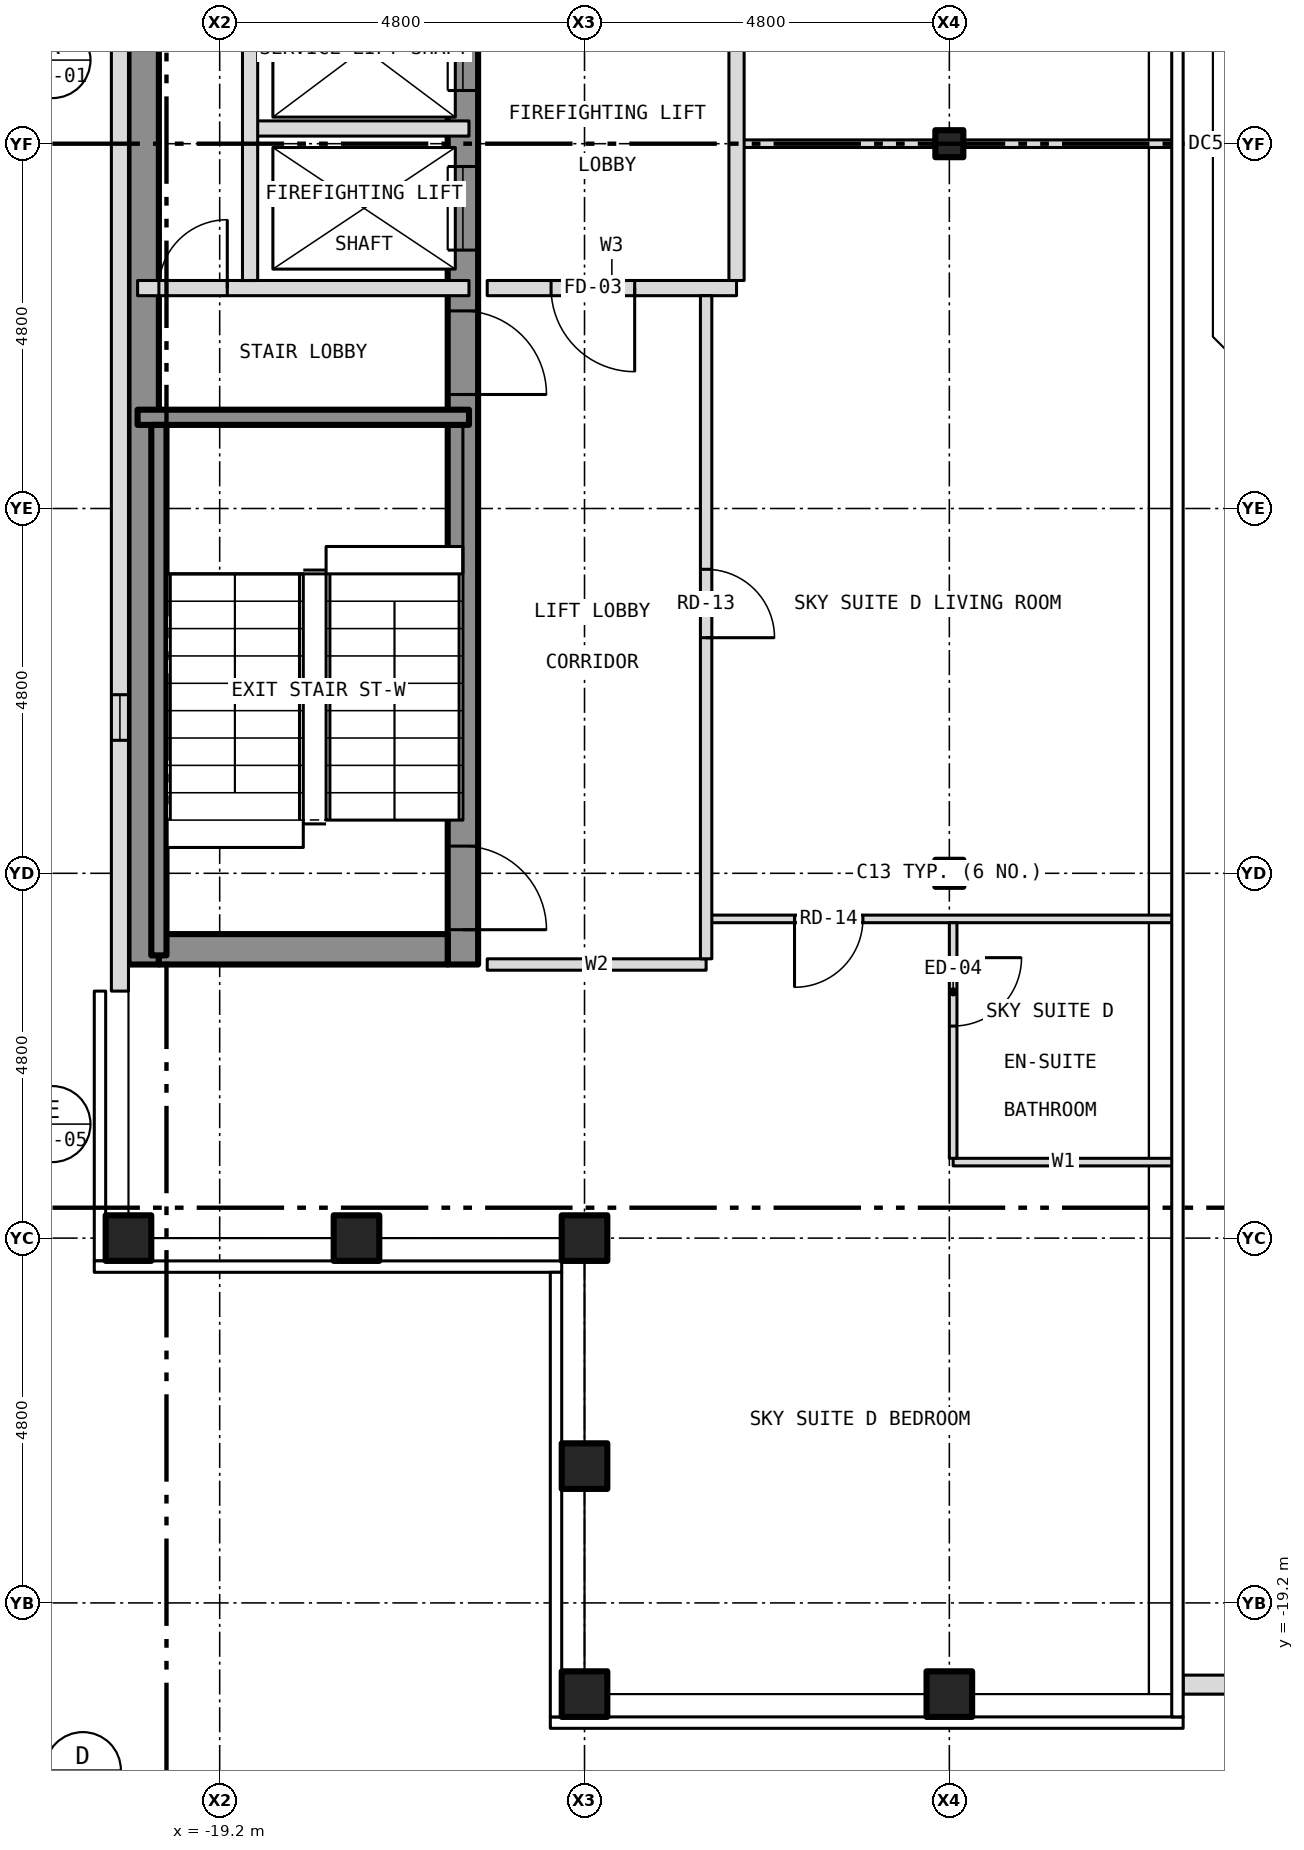
"""IFC4 building model, lengths in metres.
Left out: names, types, materials, properties, quantities, classifications, styles, units other than length and angle.
Written with IfcOpenShell. Run it as: python <this file> out.ifc"""

import sys

from ifc_helpers import new_model, si_unit, direction, frame, frame_2d, origin, origin_2d, place, context, subcontext, project, spatial, rectangle, hollow_rectangle, i_section, extrude, element, fill, save


model = new_model("IFC4")
c1 = context("Model", 3, precision=1e-05, world=origin(), true_north=direction((0.0, 1.0)))
c2 = subcontext(c1, "Body", "Model", "MODEL_VIEW")
j1 = project(units=[si_unit("LENGTHUNIT", "METRE"), si_unit("PLANEANGLEUNIT", "RADIAN")], contexts=[c1])
p1 = place(None, origin())
s1 = spatial("IfcSite", under=j1, at=p1, CompositionType="ELEMENT")
p2 = place(p1, origin())
s2 = spatial("IfcBuilding", under=s1, at=p2, CompositionType="ELEMENT")
p3 = place(p2, frame((0.0, 0.0, 265.5)))
s3 = spatial("IfcBuildingStorey", under=s2, at=p3, CompositionType="ELEMENT", Elevation=265.5)
for number, where, z_axis, x_axis in (
    (1, (-14.4, -20.4, -0.25), (0.0, 0.0, 1.0), (1.0, 0.0, 0.0)),
    (2, (-9.6, -20.4, -0.25), (0.0, 0.0, 1.0), (1.0, 0.0, 0.0)),
    (3, (-20.4, -14.4, -0.25), (0.0, 0.0, 1.0), (1.0, 0.0, 0.0)),
    (4, (-14.4, -14.4, -0.25), (0.0, 0.0, 1.0), (1.0, 0.0, 0.0)),
    (5, (-14.4, -17.4, -0.25), (0.0, 0.0, 1.0), (1.0, 0.0, 0.0)),
    (6, (-17.4, -14.4, -0.25), (0.0, 0.0, 1.0), (1.0, 0.0, 0.0)),
):
    element("IfcColumn", number, at=place(p3, frame(where, z_axis=z_axis, x_axis=x_axis)), inside=s3, PredefinedType="COLUMN", context=c2, shape_type="SweptSolid", body=[
        extrude(hollow_rectangle(XDim=0.6, YDim=0.6, WallThickness=0.03, at=origin_2d()), origin(), (0.0, 0.0, 1.0), 3.6),
    ])
for number, where, z_axis, x_axis in (
    (7, (-9.6, -9.6, -0.25), (0.0, 0.0, 1.0), (1.0, 0.0, 0.0)),
    (8, (-9.6, 0.0, -0.25), (0.0, 0.0, 1.0), (1.0, 0.0, 0.0)),
):
    element("IfcColumn", number, at=place(p3, frame(where, z_axis=z_axis, x_axis=x_axis)), inside=s3, PredefinedType="COLUMN", context=c2, shape_type="SweptSolid", body=[
        extrude(i_section(OverallWidth=0.368, OverallDepth=0.356, WebThickness=0.011, FlangeThickness=0.018, at=origin_2d()), origin(), (0.0, 0.0, 1.0), 3.6),
    ])
p4 = place(p3, frame((-16.0, -10.8, 0.0), z_axis=(0.0, 0.0, 1.0), x_axis=(0.0, 1.0, 0.0)))
e9 = element("IfcWall", 9, at=p4, inside=s3, PredefinedType="SHEAR", context=c2, shape_type="SweptSolid", body=[
    extrude(rectangle(XDim=21.6, YDim=0.4, at=frame_2d((10.8, 0.0))), origin(), (0.0, 0.0, 1.0), 3.25),
])
p5 = place(p4, frame((9.4, 0.0, 0.0)))
e10 = element("IfcOpeningElement", 10, at=p5, cuts=e9, PredefinedType="OPENING", context=c2, shape_type="SweptSolid", body=[
    extrude(rectangle(XDim=1.1, YDim=2.1, at=frame_2d((0.55, 1.05))), frame((0.0, 0.212, 0.0), z_axis=(0.0, -1.0, 0.0), x_axis=(1.0, 0.0, 0.0)), (0.0, 0.0, 1.0), 0.424),
])
p6 = place(p4, frame((11.5, 0.0, 0.0)))
e11 = element("IfcOpeningElement", 11, at=p6, cuts=e9, PredefinedType="OPENING", context=c2, shape_type="SweptSolid", body=[
    extrude(rectangle(XDim=1.1, YDim=2.1, at=frame_2d((0.55, 1.05))), frame((0.0, 0.212, 0.0), z_axis=(0.0, -1.0, 0.0), x_axis=(1.0, 0.0, 0.0)), (0.0, 0.0, 1.0), 0.424),
])
p7 = place(p4, frame((13.6, 0.0, 0.0)))
e12 = element("IfcOpeningElement", 12, at=p7, cuts=e9, PredefinedType="OPENING", context=c2, shape_type="SweptSolid", body=[
    extrude(rectangle(XDim=1.1, YDim=2.1, at=frame_2d((0.55, 1.05))), frame((0.0, 0.212, 0.0), z_axis=(0.0, -1.0, 0.0), x_axis=(1.0, 0.0, 0.0)), (0.0, 0.0, 1.0), 0.424),
])
p8 = place(p4, frame((15.7, 0.0, 0.0)))
e13 = element("IfcOpeningElement", 13, at=p8, cuts=e9, PredefinedType="OPENING", context=c2, shape_type="SweptSolid", body=[
    extrude(rectangle(XDim=1.1, YDim=2.1, at=frame_2d((0.55, 1.05))), frame((0.0, 0.212, 0.0), z_axis=(0.0, -1.0, 0.0), x_axis=(1.0, 0.0, 0.0)), (0.0, 0.0, 1.0), 0.424),
])
p9 = place(p4, frame((17.8, 0.0, 0.0)))
e14 = element("IfcOpeningElement", 14, at=p9, cuts=e9, PredefinedType="OPENING", context=c2, shape_type="SweptSolid", body=[
    extrude(rectangle(XDim=1.1, YDim=2.1, at=frame_2d((0.55, 1.05))), frame((0.0, 0.212, 0.0), z_axis=(0.0, -1.0, 0.0), x_axis=(1.0, 0.0, 0.0)), (0.0, 0.0, 1.0), 0.424),
])
p10 = place(p4, frame((0.458, 0.0, 0.0)))
e15 = element("IfcOpeningElement", 15, at=p10, cuts=e9, PredefinedType="OPENING", context=c2, shape_type="SweptSolid", body=[
    extrude(rectangle(XDim=1.1, YDim=2.1, at=frame_2d((0.55, 1.05))), frame((0.0, 0.212, 0.0), z_axis=(0.0, -1.0, 0.0), x_axis=(1.0, 0.0, 0.0)), (0.0, 0.0, 1.0), 0.424),
])
p11 = place(p4, frame((7.5, 0.0, 0.0)))
e16 = element("IfcOpeningElement", 16, at=p11, cuts=e9, PredefinedType="OPENING", context=c2, shape_type="SweptSolid", body=[
    extrude(rectangle(XDim=1.1, YDim=2.1, at=frame_2d((0.55, 1.05))), frame((0.0, 0.212, 0.0), z_axis=(0.0, -1.0, 0.0), x_axis=(1.0, 0.0, 0.0)), (0.0, 0.0, 1.0), 0.424),
])
p12 = place(p4, frame((20.0, 0.0, 0.0)))
e17 = element("IfcOpeningElement", 17, at=p12, cuts=e9, PredefinedType="OPENING", context=c2, shape_type="SweptSolid", body=[
    extrude(rectangle(XDim=0.9, YDim=2.1, at=frame_2d((0.45, 1.05))), frame((0.0, 0.212, 0.0), z_axis=(0.0, -1.0, 0.0), x_axis=(1.0, 0.0, 0.0)), (0.0, 0.0, 1.0), 0.424),
])
p13 = place(p3, frame((-20.2, -10.8, 0.0), z_axis=(0.0, 0.0, 1.0), x_axis=(0.0, 1.0, 0.0)))
e18 = element("IfcWall", 18, at=p13, inside=s3, PredefinedType="SHEAR", context=c2, shape_type="SweptSolid", body=[
    extrude(rectangle(XDim=21.6, YDim=0.4, at=frame_2d((10.8, 0.0))), origin(), (0.0, 0.0, 1.0), 3.25),
])
p14 = place(p3, frame((-20.0, -10.6, 0.0), z_axis=(0.0, 0.0, 1.0), x_axis=(1.0, 0.0, 0.0)))
e19 = element("IfcWall", 19, at=p14, inside=s3, PredefinedType="SHEAR", context=c2, shape_type="SweptSolid", body=[
    extrude(rectangle(XDim=3.8, YDim=0.4, at=frame_2d((1.9, 0.0))), origin(), (0.0, 0.0, 1.0), 3.25),
])
p15 = place(p3, frame((-20.512, 11.15, 0.0), z_axis=(0.0, 0.0, 1.0), x_axis=(0.0, -1.0, 0.0)))
e20 = element("IfcWall", 20, at=p15, inside=s3, PredefinedType="SOLIDWALL", context=c2, shape_type="SweptSolid", body=[
    extrude(rectangle(XDim=22.3, YDim=0.225, at=frame_2d((11.15, 0.0))), origin(), (0.0, 0.0, 1.0), 3.5),
])
p16 = place(p15, frame((18.4, 0.0, 1.0)))
e21 = element("IfcOpeningElement", 21, at=p16, cuts=e20, PredefinedType="OPENING", context=c2, shape_type="SweptSolid", body=[
    extrude(rectangle(XDim=0.6, YDim=1.5, at=frame_2d((0.3, 0.75))), frame((0.0, 0.125, 0.0), z_axis=(0.0, -1.0, 0.0), x_axis=(1.0, 0.0, 0.0)), (0.0, 0.0, 1.0), 0.249),
])
p17 = place(p3, frame((-6.524, -20.275, 0.0), z_axis=(0.0, 0.0, 1.0), x_axis=(1.0, 0.0, 0.0)))
e22 = element("IfcWall", 22, at=p17, inside=s3, PredefinedType="PARAPET", context=c2, shape_type="SweptSolid", body=[
    extrude(rectangle(XDim=13.048, YDim=0.25, at=frame_2d((6.524, 0.0))), origin(), (0.0, 0.0, 1.0), 1.1),
])
p18 = place(p3, frame((-9.55, -13.4, 0.0), z_axis=(0.0, 0.0, 1.0), x_axis=(1.0, 0.0, 0.0)))
e23 = element("IfcWall", 23, at=p18, inside=s3, PredefinedType="PARTITIONING", context=c2, shape_type="SweptSolid", body=[
    extrude(rectangle(XDim=2.906, YDim=0.1, at=frame_2d((1.453, 0.0))), origin(), (0.0, 0.0, 1.0), 3.35),
])
p19 = place(p3, frame((-15.68, -10.8, 0.0), z_axis=(0.0, 0.0, 1.0), x_axis=(1.0, 0.0, 0.0)))
e24 = element("IfcWall", 24, at=p19, inside=s3, PredefinedType="PARTITIONING", context=c2, shape_type="SweptSolid", body=[
    extrude(rectangle(XDim=2.88, YDim=0.15, at=frame_2d((1.44, 0.0))), origin(), (0.0, 0.0, 1.0), 3.35),
])
p20 = place(p3, frame((-12.8, -10.2, 0.0), z_axis=(0.0, 0.0, 1.0), x_axis=(1.0, 0.0, 0.0)))
e25 = element("IfcWall", 25, at=p20, inside=s3, PredefinedType="PARTITIONING", context=c2, shape_type="SweptSolid", body=[
    extrude(rectangle(XDim=6.156, YDim=0.1, at=frame_2d((3.078, 0.0))), origin(), (0.0, 0.0, 1.0), 3.35),
])
p21 = place(p20, frame((1.163, 0.0, 0.0)))
e26 = element("IfcOpeningElement", 26, at=p21, cuts=e25, PredefinedType="OPENING", context=c2, shape_type="SweptSolid", body=[
    extrude(rectangle(XDim=0.9, YDim=2.1, at=frame_2d((0.45, 1.05))), frame((0.0, 0.062, 0.0), z_axis=(0.0, -1.0, 0.0), x_axis=(1.0, 0.0, 0.0)), (0.0, 0.0, 1.0), 0.124),
])
p22 = place(p3, frame((-20.28, -3.6, 0.0), z_axis=(0.0, 0.0, 1.0), x_axis=(1.0, 0.0, 0.0)))
e27 = element("IfcWall", 27, at=p22, inside=s3, PredefinedType="SHEAR", context=c2, shape_type="SweptSolid", body=[
    extrude(rectangle(XDim=4.36, YDim=0.2, at=frame_2d((2.18, 0.0))), origin(), (0.0, 0.0, 1.0), 3.25),
])
p23 = place(p3, frame((-20.28, -1.9, 0.0), z_axis=(0.0, 0.0, 1.0), x_axis=(1.0, 0.0, 0.0)))
e28 = element("IfcWall", 28, at=p23, inside=s3, PredefinedType="PARTITIONING", context=c2, shape_type="SweptSolid", body=[
    extrude(rectangle(XDim=4.36, YDim=0.2, at=frame_2d((2.18, 0.0))), origin(), (0.0, 0.0, 1.0), 3.25),
])
p24 = place(p23, frame((0.28, 0.0, 0.0)))
e29 = element("IfcOpeningElement", 29, at=p24, cuts=e28, PredefinedType="OPENING", context=c2, shape_type="SweptSolid", body=[
    extrude(rectangle(XDim=0.9, YDim=2.1, at=frame_2d((0.45, 1.05))), frame((0.0, 0.112, 0.0), z_axis=(0.0, -1.0, 0.0), x_axis=(1.0, 0.0, 0.0)), (0.0, 0.0, 1.0), 0.224),
])
p25 = place(p3, frame((-15.68, -1.9, 0.0), z_axis=(0.0, 0.0, 1.0), x_axis=(1.0, 0.0, 0.0)))
e30 = element("IfcWall", 30, at=p25, inside=s3, PredefinedType="PARTITIONING", context=c2, shape_type="SweptSolid", body=[
    extrude(rectangle(XDim=3.28, YDim=0.2, at=frame_2d((1.64, 0.0))), origin(), (0.0, 0.0, 1.0), 3.35),
])
p26 = place(p25, frame((0.84, 0.0, 0.0)))
e31 = element("IfcOpeningElement", 31, at=p26, cuts=e30, PredefinedType="OPENING", context=c2, shape_type="SweptSolid", body=[
    extrude(rectangle(XDim=1.1, YDim=2.1, at=frame_2d((0.55, 1.05))), frame((0.0, 0.112, 0.0), z_axis=(0.0, -1.0, 0.0), x_axis=(1.0, 0.0, 0.0)), (0.0, 0.0, 1.0), 0.224),
])
p27 = place(p3, frame((-12.4, 0.0, 0.0), z_axis=(0.0, 0.0, 1.0), x_axis=(1.0, 0.0, 0.0)))
e32 = element("IfcWall", 32, at=p27, inside=s3, PredefinedType="PARTITIONING", context=c2, shape_type="SweptSolid", body=[
    extrude(rectangle(XDim=2.616, YDim=0.1, at=frame_2d((1.308, 0.0))), origin(), (0.0, 0.0, 1.0), 2.728),
])
p28 = place(p3, frame((-9.784, 0.0, 0.0), z_axis=(0.0, 0.0, 1.0), x_axis=(1.0, 0.0, 0.0)))
e33 = element("IfcWall", 33, at=p28, inside=s3, PredefinedType="PARTITIONING", context=c2, shape_type="SweptSolid", body=[
    extrude(rectangle(XDim=0.368, YDim=0.1, at=frame_2d((0.184, 0.0))), origin(), (0.0, 0.0, 1.0), 3.35),
])
p29 = place(p3, frame((-9.416, 0.0, 0.0), z_axis=(0.0, 0.0, 1.0), x_axis=(1.0, 0.0, 0.0)))
e34 = element("IfcWall", 34, at=p29, inside=s3, PredefinedType="PARTITIONING", context=c2, shape_type="SweptSolid", body=[
    extrude(rectangle(XDim=2.772, YDim=0.1, at=frame_2d((1.386, 0.0))), origin(), (0.0, 0.0, 1.0), 2.728),
])
p30 = place(p3, frame((-18.8, 0.2, 0.0), z_axis=(0.0, 0.0, 1.0), x_axis=(1.0, 0.0, 0.0)))
e35 = element("IfcWall", 35, at=p30, inside=s3, PredefinedType="PARTITIONING", context=c2, shape_type="SweptSolid", body=[
    extrude(rectangle(XDim=2.88, YDim=0.2, at=frame_2d((1.44, 0.0))), origin(), (0.0, 0.0, 1.0), 3.25),
])
p31 = place(p3, frame((-20.0, -10.68, 0.0), z_axis=(0.0, 0.0, 1.0), x_axis=(0.0, 1.0, 0.0)))
e36 = element("IfcWall", 36, at=p31, inside=s3, PredefinedType="SHEAR", context=c2, shape_type="SweptSolid", body=[
    extrude(rectangle(XDim=6.98, YDim=0.2, at=frame_2d((3.49, 0.0))), origin(), (0.0, 0.0, 1.0), 3.25),
])
p32 = place(p3, frame((-18.8, -1.8, 0.0), z_axis=(0.0, 0.0, 1.0), x_axis=(0.0, 1.0, 0.0)))
e37 = element("IfcWall", 37, at=p32, inside=s3, PredefinedType="PARTITIONING", context=c2, shape_type="SweptSolid", body=[
    extrude(rectangle(XDim=12.48, YDim=0.2, at=frame_2d((6.24, 0.0))), origin(), (0.0, 0.0, 1.0), 3.25),
])
p33 = place(p3, frame((-12.8, -10.725, 0.0), z_axis=(0.0, 0.0, 1.0), x_axis=(0.0, 1.0, 0.0)))
e38 = element("IfcWall", 38, at=p33, inside=s3, PredefinedType="PARTITIONING", context=c2, shape_type="SweptSolid", body=[
    extrude(rectangle(XDim=8.725, YDim=0.15, at=frame_2d((4.363, 0.0))), origin(), (0.0, 0.0, 1.0), 3.35),
])
p34 = place(p33, frame((4.225, 0.0, 0.0)))
e39 = element("IfcOpeningElement", 39, at=p34, cuts=e38, PredefinedType="OPENING", context=c2, shape_type="SweptSolid", body=[
    extrude(rectangle(XDim=0.9, YDim=2.1, at=frame_2d((0.45, 1.05))), frame((0.0, 0.087, 0.0), z_axis=(0.0, -1.0, 0.0), x_axis=(1.0, 0.0, 0.0)), (0.0, 0.0, 1.0), 0.174),
])
p35 = place(p3, frame((-12.4, -1.8, 0.0), z_axis=(0.0, 0.0, 1.0), x_axis=(0.0, 1.0, 0.0)))
e40 = element("IfcWall", 40, at=p35, inside=s3, PredefinedType="PARTITIONING", context=c2, shape_type="SweptSolid", body=[
    extrude(rectangle(XDim=4.0, YDim=0.2, at=frame_2d((2.0, 0.0))), origin(), (0.0, 0.0, 1.0), 3.35),
])
p36 = place(p3, frame((-9.55, -13.35, 0.0), z_axis=(0.0, 0.0, 1.0), x_axis=(0.0, 1.0, 0.0)))
e41 = element("IfcWall", 41, at=p36, inside=s3, PredefinedType="PARTITIONING", context=c2, shape_type="SweptSolid", body=[
    extrude(rectangle(XDim=3.1, YDim=0.1, at=frame_2d((1.55, 0.0))), origin(), (0.0, 0.0, 1.0), 2.728),
])
p37 = place(p36, frame((1.74, 0.0, 0.0)))
e42 = element("IfcOpeningElement", 42, at=p37, cuts=e41, PredefinedType="OPENING", context=c2, shape_type="SweptSolid", body=[
    extrude(rectangle(XDim=0.9, YDim=2.1, at=frame_2d((0.45, 1.05))), frame((0.0, 0.062, 0.0), z_axis=(0.0, -1.0, 0.0), x_axis=(1.0, 0.0, 0.0)), (0.0, 0.0, 1.0), 0.124),
])
p38 = place(p16, origin())
e43 = element("IfcWindow", 43, at=p38, inside=s3, PartitioningType="SINGLE_PANEL", PredefinedType="WINDOW", context=c2, shape_type="SweptSolid", body=[
    extrude(rectangle(XDim=0.6, YDim=1.5, at=frame_2d((0.3, 0.75))), frame((0.0, -0.022, 0.0), z_axis=(0.0, -1.0, 0.0), x_axis=(1.0, 0.0, 0.0)), (0.0, 0.0, 1.0), 0.06),
])
fill(e21, e43)
p39 = place(p5, origin())
e44 = element("IfcDoor", 44, at=p39, inside=s3, OperationType="SLIDING_TO_LEFT", PredefinedType="DOOR", context=c2, shape_type="SweptSolid", body=[
    extrude(rectangle(XDim=1.1, YDim=2.1, at=frame_2d((0.55, 1.05))), frame((0.0, 0.025, 0.0), z_axis=(0.0, -1.0, 0.0), x_axis=(1.0, 0.0, 0.0)), (0.0, 0.0, 1.0), 0.05),
])
fill(e10, e44)
p40 = place(p6, origin())
e45 = element("IfcDoor", 45, at=p40, inside=s3, OperationType="SLIDING_TO_LEFT", PredefinedType="DOOR", context=c2, shape_type="SweptSolid", body=[
    extrude(rectangle(XDim=1.1, YDim=2.1, at=frame_2d((0.55, 1.05))), frame((0.0, 0.025, 0.0), z_axis=(0.0, -1.0, 0.0), x_axis=(1.0, 0.0, 0.0)), (0.0, 0.0, 1.0), 0.05),
])
fill(e11, e45)
p41 = place(p10, origin())
e46 = element("IfcDoor", 46, at=p41, inside=s3, OperationType="SINGLE_SWING_LEFT", PredefinedType="DOOR", context=c2, shape_type="SweptSolid", body=[
    extrude(rectangle(XDim=1.1, YDim=2.1, at=frame_2d((0.55, 1.05))), frame((0.0, 0.025, 0.0), z_axis=(0.0, -1.0, 0.0), x_axis=(1.0, 0.0, 0.0)), (0.0, 0.0, 1.0), 0.05),
])
fill(e15, e46)
p42 = place(p11, origin())
e47 = element("IfcDoor", 47, at=p42, inside=s3, OperationType="SINGLE_SWING_LEFT", PredefinedType="DOOR", context=c2, shape_type="SweptSolid", body=[
    extrude(rectangle(XDim=1.1, YDim=2.1, at=frame_2d((0.55, 1.05))), frame((0.0, 0.025, 0.0), z_axis=(0.0, -1.0, 0.0), x_axis=(1.0, 0.0, 0.0)), (0.0, 0.0, 1.0), 0.05),
])
fill(e16, e47)
p43 = place(p24, origin())
e48 = element("IfcDoor", 48, at=p43, inside=s3, OperationType="SINGLE_SWING_RIGHT", PredefinedType="DOOR", context=c2, shape_type="SweptSolid", body=[
    extrude(rectangle(XDim=0.9, YDim=2.1, at=frame_2d((0.45, 1.05))), frame((0.0, 0.025, 0.0), z_axis=(0.0, -1.0, 0.0), x_axis=(1.0, 0.0, 0.0)), (0.0, 0.0, 1.0), 0.05),
])
fill(e29, e48)
p44 = place(p26, origin())
e49 = element("IfcDoor", 49, at=p44, inside=s3, OperationType="SINGLE_SWING_RIGHT", PredefinedType="DOOR", context=c2, shape_type="SweptSolid", body=[
    extrude(rectangle(XDim=1.1, YDim=2.1, at=frame_2d((0.55, 1.05))), frame((0.0, 0.025, 0.0), z_axis=(0.0, -1.0, 0.0), x_axis=(1.0, 0.0, 0.0)), (0.0, 0.0, 1.0), 0.05),
])
fill(e31, e49)
p45 = place(p34, origin())
e50 = element("IfcDoor", 50, at=p45, inside=s3, OperationType="SINGLE_SWING_LEFT", PredefinedType="DOOR", context=c2, shape_type="SweptSolid", body=[
    extrude(rectangle(XDim=0.9, YDim=2.1, at=frame_2d((0.45, 1.05))), frame((0.0, 0.025, 0.0), z_axis=(0.0, -1.0, 0.0), x_axis=(1.0, 0.0, 0.0)), (0.0, 0.0, 1.0), 0.05),
])
fill(e39, e50)
p46 = place(p21, origin())
e51 = element("IfcDoor", 51, at=p46, inside=s3, OperationType="SINGLE_SWING_LEFT", PredefinedType="DOOR", context=c2, shape_type="SweptSolid", body=[
    extrude(rectangle(XDim=0.9, YDim=2.1, at=frame_2d((0.45, 1.05))), frame((0.0, 0.025, 0.0), z_axis=(0.0, -1.0, 0.0), x_axis=(1.0, 0.0, 0.0)), (0.0, 0.0, 1.0), 0.05),
])
fill(e26, e51)
p47 = place(p37, origin())
e52 = element("IfcDoor", 52, at=p47, inside=s3, OperationType="SINGLE_SWING_RIGHT", PredefinedType="DOOR", context=c2, shape_type="SweptSolid", body=[
    extrude(rectangle(XDim=0.9, YDim=2.1, at=frame_2d((0.45, 1.05))), frame((0.0, 0.025, 0.0), z_axis=(0.0, -1.0, 0.0), x_axis=(1.0, 0.0, 0.0)), (0.0, 0.0, 1.0), 0.05),
])
fill(e42, e52)
save(model, sys.argv[1])
